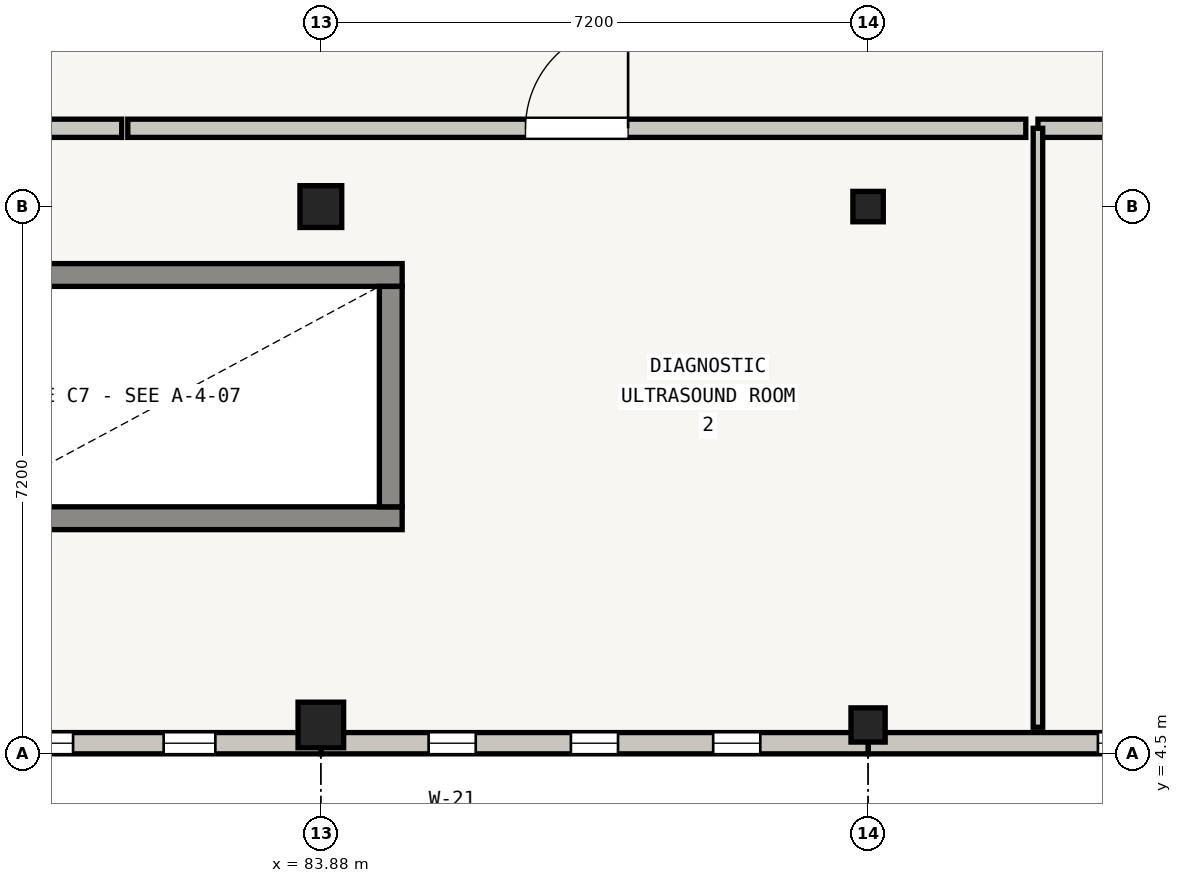
"""IFC4 building model, lengths in metres.
Left out: names, types, materials, properties, quantities, classifications, styles, units other than length and angle.
Written with IfcOpenShell. Run it as: python <this file> out.ifc"""

import sys

from ifc_helpers import new_model, si_unit, direction, frame, frame_2d, origin, origin_2d, place, context, subcontext, project, spatial, rectangle, extrude, element, fill, save


model = new_model("IFC4")
c1 = context("Model", 3, precision=1e-05, world=origin(), true_north=direction((0.0, 1.0)))
c2 = subcontext(c1, "Body", "Model", "MODEL_VIEW")
j1 = project(units=[si_unit("LENGTHUNIT", "METRE"), si_unit("PLANEANGLEUNIT", "RADIAN")], contexts=[c1])
p1 = place(None, origin())
s1 = spatial("IfcSite", under=j1, at=p1, CompositionType="ELEMENT")
p2 = place(p1, origin())
s2 = spatial("IfcBuilding", under=s1, at=p2, CompositionType="ELEMENT")
p3 = place(p2, frame((0.0, 0.0, 4.5)))
s3 = spatial("IfcBuildingStorey", under=s2, at=p3, CompositionType="ELEMENT", Elevation=4.5)
p4 = place(p3, frame((83.88, 4.88, 0.0), z_axis=(0.0, 0.0, 1.0), x_axis=(1.0, 0.0, 0.0)))
e1 = element("IfcColumn", 1, at=p4, inside=s3, PredefinedType="COLUMN", context=c2, shape_type="SweptSolid", body=[
    extrude(rectangle(XDim=0.6, YDim=0.6, at=origin_2d()), origin(), (0.0, 0.0, 1.0), 3.96),
])
p5 = place(p3, frame((83.88, 11.7, 0.0), z_axis=(0.0, 0.0, 1.0), x_axis=(1.0, 0.0, 0.0)))
e2 = element("IfcColumn", 2, at=p5, inside=s3, PredefinedType="COLUMN", context=c2, shape_type="SweptSolid", body=[
    extrude(rectangle(XDim=0.55, YDim=0.55, at=origin_2d()), origin(), (0.0, 0.0, 1.0), 3.96),
])
p6 = place(p3, frame((91.08, 4.88, 0.0), z_axis=(0.0, 0.0, 1.0), x_axis=(1.0, 0.0, 0.0)))
e3 = element("IfcColumn", 3, at=p6, inside=s3, PredefinedType="COLUMN", context=c2, shape_type="SweptSolid", body=[
    extrude(rectangle(XDim=0.45, YDim=0.45, at=origin_2d()), origin(), (0.0, 0.0, 1.0), 3.96),
])
p7 = place(p3, frame((91.08, 11.7, 0.0), z_axis=(0.0, 0.0, 1.0), x_axis=(1.0, 0.0, 0.0)))
e4 = element("IfcColumn", 4, at=p7, inside=s3, PredefinedType="COLUMN", context=c2, shape_type="SweptSolid", body=[
    extrude(rectangle(XDim=0.4, YDim=0.4, at=origin_2d()), origin(), (0.0, 0.0, 1.0), 3.96),
])
p8 = place(p3, frame((98.28, 4.64, 0.0), z_axis=(0.0, 0.0, 1.0), x_axis=(-1.0, 0.0, 0.0)))
e5 = element("IfcWall", 5, at=p8, inside=s3, PredefinedType="STANDARD", context=c2, shape_type="SweptSolid", body=[
    extrude(rectangle(XDim=7.2, YDim=0.28, at=frame_2d((3.6, 0.0))), origin(), (0.0, 0.0, 1.0), 3.656),
])
p9 = place(p8, frame((1.824, 0.0, 0.55)))
e6 = element("IfcOpeningElement", 6, at=p9, cuts=e5, PredefinedType="OPENING", context=c2, shape_type="SweptSolid", body=[
    extrude(rectangle(XDim=0.96, YDim=2.1, at=frame_2d((0.48, 1.05))), frame((0.0, 0.14, 0.0), z_axis=(0.0, -1.0, 0.0), x_axis=(1.0, 0.0, 0.0)), (0.0, 0.0, 1.0), 0.28),
])
p10 = place(p8, frame((3.216, 0.0, 0.55)))
e7 = element("IfcOpeningElement", 7, at=p10, cuts=e5, PredefinedType="OPENING", context=c2, shape_type="SweptSolid", body=[
    extrude(rectangle(XDim=0.96, YDim=2.1, at=frame_2d((0.48, 1.05))), frame((0.0, 0.14, 0.0), z_axis=(0.0, -1.0, 0.0), x_axis=(1.0, 0.0, 0.0)), (0.0, 0.0, 1.0), 0.28),
])
p11 = place(p3, frame((91.08, 4.64, 0.0), z_axis=(0.0, 0.0, 1.0), x_axis=(-1.0, 0.0, 0.0)))
e8 = element("IfcWall", 8, at=p11, inside=s3, PredefinedType="STANDARD", context=c2, shape_type="SweptSolid", body=[
    extrude(rectangle(XDim=7.2, YDim=0.28, at=frame_2d((3.6, 0.0))), origin(), (0.0, 0.0, 1.0), 3.656),
])
p12 = place(p11, frame((1.418, 0.0, 0.55)))
e9 = element("IfcOpeningElement", 9, at=p12, cuts=e8, PredefinedType="OPENING", context=c2, shape_type="SweptSolid", body=[
    extrude(rectangle(XDim=0.62, YDim=2.08, at=frame_2d((0.31, 1.04))), frame((0.0, 0.14, 0.0), z_axis=(0.0, -1.0, 0.0), x_axis=(1.0, 0.0, 0.0)), (0.0, 0.0, 1.0), 0.28),
])
p13 = place(p11, frame((3.29, 0.0, 0.55)))
e10 = element("IfcOpeningElement", 10, at=p13, cuts=e8, PredefinedType="OPENING", context=c2, shape_type="SweptSolid", body=[
    extrude(rectangle(XDim=0.62, YDim=2.08, at=frame_2d((0.31, 1.04))), frame((0.0, 0.14, 0.0), z_axis=(0.0, -1.0, 0.0), x_axis=(1.0, 0.0, 0.0)), (0.0, 0.0, 1.0), 0.28),
])
p14 = place(p11, frame((5.162, 0.0, 0.55)))
e11 = element("IfcOpeningElement", 11, at=p14, cuts=e8, PredefinedType="OPENING", context=c2, shape_type="SweptSolid", body=[
    extrude(rectangle(XDim=0.62, YDim=2.08, at=frame_2d((0.31, 1.04))), frame((0.0, 0.14, 0.0), z_axis=(0.0, -1.0, 0.0), x_axis=(1.0, 0.0, 0.0)), (0.0, 0.0, 1.0), 0.28),
])
p15 = place(p3, frame((83.88, 4.64, 0.0), z_axis=(0.0, 0.0, 1.0), x_axis=(-1.0, 0.0, 0.0)))
e12 = element("IfcWall", 12, at=p15, inside=s3, PredefinedType="STANDARD", context=c2, shape_type="SweptSolid", body=[
    extrude(rectangle(XDim=7.2, YDim=0.28, at=frame_2d((3.6, 0.0))), origin(), (0.0, 0.0, 1.0), 3.656),
])
p16 = place(p15, frame((1.388, 0.0, 0.55)))
e13 = element("IfcOpeningElement", 13, at=p16, cuts=e12, PredefinedType="OPENING", context=c2, shape_type="SweptSolid", body=[
    extrude(rectangle(XDim=0.68, YDim=2.08, at=frame_2d((0.34, 1.04))), frame((0.0, 0.14, 0.0), z_axis=(0.0, -1.0, 0.0), x_axis=(1.0, 0.0, 0.0)), (0.0, 0.0, 1.0), 0.28),
])
p17 = place(p15, frame((3.26, 0.0, 0.55)))
e14 = element("IfcOpeningElement", 14, at=p17, cuts=e12, PredefinedType="OPENING", context=c2, shape_type="SweptSolid", body=[
    extrude(rectangle(XDim=0.68, YDim=2.08, at=frame_2d((0.34, 1.04))), frame((0.0, 0.14, 0.0), z_axis=(0.0, -1.0, 0.0), x_axis=(1.0, 0.0, 0.0)), (0.0, 0.0, 1.0), 0.28),
])
p18 = place(p15, frame((5.132, 0.0, 0.55)))
e15 = element("IfcOpeningElement", 15, at=p18, cuts=e12, PredefinedType="OPENING", context=c2, shape_type="SweptSolid", body=[
    extrude(rectangle(XDim=0.68, YDim=2.08, at=frame_2d((0.34, 1.04))), frame((0.0, 0.14, 0.0), z_axis=(0.0, -1.0, 0.0), x_axis=(1.0, 0.0, 0.0)), (0.0, 0.0, 1.0), 0.28),
])
p19 = place(p3, frame((84.95, 7.6, 0.0), z_axis=(0.0, 0.0, 1.0), x_axis=(-1.0, 0.0, 0.0)))
e16 = element("IfcWall", 16, at=p19, inside=s3, PredefinedType="SHEAR", context=c2, shape_type="SweptSolid", body=[
    extrude(rectangle(XDim=7.3, YDim=0.3, at=frame_2d((3.65, 0.0))), origin(), (0.0, 0.0, 1.0), 3.885),
])
p20 = place(p3, frame((77.65, 10.8, 0.0), z_axis=(0.0, 0.0, 1.0), x_axis=(1.0, 0.0, 0.0)))
e17 = element("IfcWall", 17, at=p20, inside=s3, PredefinedType="SHEAR", context=c2, shape_type="SweptSolid", body=[
    extrude(rectangle(XDim=7.3, YDim=0.3, at=frame_2d((3.65, 0.0))), origin(), (0.0, 0.0, 1.0), 3.885),
])
p21 = place(p20, frame((0.16, 0.0, 0.0)))
e18 = element("IfcOpeningElement", 18, at=p21, cuts=e17, PredefinedType="OPENING", context=c2, shape_type="SweptSolid", body=[
    extrude(rectangle(XDim=1.1, YDim=2.05, at=frame_2d((0.55, 1.025))), frame((0.0, 0.15, 0.0), z_axis=(0.0, -1.0, 0.0), x_axis=(1.0, 0.0, 0.0)), (0.0, 0.0, 1.0), 0.3),
])
p22 = place(p3, frame((84.8, 10.65, 0.0), z_axis=(0.0, 0.0, 1.0), x_axis=(0.0, -1.0, 0.0)))
e19 = element("IfcWall", 19, at=p22, inside=s3, PredefinedType="SHEAR", context=c2, shape_type="SweptSolid", body=[
    extrude(rectangle(XDim=2.9, YDim=0.3, at=frame_2d((1.45, 0.0))), origin(), (0.0, 0.0, 1.0), 3.885),
])
p23 = place(p3, frame((65.84, 12.73, 0.0), z_axis=(0.0, 0.0, 1.0), x_axis=(1.0, 0.0, 0.0)))
e20 = element("IfcWall", 20, at=p23, inside=s3, PredefinedType="SOLIDWALL", context=c2, shape_type="SweptSolid", body=[
    extrude(rectangle(XDim=15.42, YDim=0.24, at=frame_2d((7.71, 0.0))), origin(), (0.0, 0.0, 1.0), 2.905),
])
p24 = place(p23, frame((7.035, 0.0, 0.0)))
e21 = element("IfcOpeningElement", 21, at=p24, cuts=e20, PredefinedType="OPENING", context=c2, shape_type="SweptSolid", body=[
    extrude(rectangle(XDim=1.35, YDim=2.1, at=frame_2d((0.675, 1.05))), frame((0.0, 0.12, 0.0), z_axis=(0.0, -1.0, 0.0), x_axis=(1.0, 0.0, 0.0)), (0.0, 0.0, 1.0), 0.24),
])
p25 = place(p3, frame((93.315, 12.73, 0.0), z_axis=(0.0, 0.0, 1.0), x_axis=(1.0, 0.0, 0.0)))
e22 = element("IfcWall", 22, at=p25, inside=s3, PredefinedType="SOLIDWALL", context=c2, shape_type="SweptSolid", body=[
    extrude(rectangle(XDim=11.815, YDim=0.24, at=frame_2d((5.907, 0.0))), origin(), (0.0, 0.0, 1.0), 2.905),
])
p26 = place(p25, frame((6.802, 0.0, 0.0)))
e23 = element("IfcOpeningElement", 23, at=p26, cuts=e22, PredefinedType="OPENING", context=c2, shape_type="SweptSolid", body=[
    extrude(rectangle(XDim=1.35, YDim=2.1, at=frame_2d((0.675, 1.05))), frame((0.0, 0.12, 0.0), z_axis=(0.0, -1.0, 0.0), x_axis=(1.0, 0.0, 0.0)), (0.0, 0.0, 1.0), 0.24),
])
p27 = place(p3, frame((93.315, 4.85, 0.0), z_axis=(0.0, 0.0, 1.0), x_axis=(0.0, 1.0, 0.0)))
e24 = element("IfcWall", 24, at=p27, inside=s3, PredefinedType="PARTITIONING", context=c2, shape_type="SweptSolid", body=[
    extrude(rectangle(XDim=7.88, YDim=0.125, at=frame_2d((3.94, 0.0))), origin(), (0.0, 0.0, 1.0), 2.905),
])
p28 = place(p3, frame((81.34, 12.73, 0.0), z_axis=(0.0, 0.0, 1.0), x_axis=(1.0, 0.0, 0.0)))
e25 = element("IfcWall", 25, at=p28, inside=s3, PredefinedType="SOLIDWALL", context=c2, shape_type="SweptSolid", body=[
    extrude(rectangle(XDim=11.815, YDim=0.24, at=frame_2d((5.907, 0.0))), origin(), (0.0, 0.0, 1.0), 2.905),
])
p29 = place(p28, frame((5.232, 0.0, 0.0)))
e26 = element("IfcOpeningElement", 26, at=p29, cuts=e25, PredefinedType="OPENING", context=c2, shape_type="SweptSolid", body=[
    extrude(rectangle(XDim=1.35, YDim=2.1, at=frame_2d((0.675, 1.05))), frame((0.0, 0.12, 0.0), z_axis=(0.0, -1.0, 0.0), x_axis=(1.0, 0.0, 0.0)), (0.0, 0.0, 1.0), 0.24),
])
p30 = place(p10, origin())
e27 = element("IfcWindow", 27, at=p30, inside=s3, PartitioningType="DOUBLE_PANEL_VERTICAL", PredefinedType="WINDOW", context=c2, shape_type="SweptSolid", body=[
    extrude(rectangle(XDim=0.96, YDim=2.1, at=frame_2d((0.48, 1.05))), frame((0.0, 0.03, 0.0), z_axis=(0.0, -1.0, 0.0), x_axis=(1.0, 0.0, 0.0)), (0.0, 0.0, 1.0), 0.06),
])
fill(e7, e27)
p31 = place(p12, origin())
e28 = element("IfcWindow", 28, at=p31, inside=s3, PartitioningType="SINGLE_PANEL", PredefinedType="WINDOW", context=c2, shape_type="SweptSolid", body=[
    extrude(rectangle(XDim=0.62, YDim=2.08, at=frame_2d((0.31, 1.04))), frame((0.0, 0.03, 0.0), z_axis=(0.0, -1.0, 0.0), x_axis=(1.0, 0.0, 0.0)), (0.0, 0.0, 1.0), 0.06),
])
fill(e9, e28)
p32 = place(p13, origin())
e29 = element("IfcWindow", 29, at=p32, inside=s3, PartitioningType="SINGLE_PANEL", PredefinedType="WINDOW", context=c2, shape_type="SweptSolid", body=[
    extrude(rectangle(XDim=0.62, YDim=2.08, at=frame_2d((0.31, 1.04))), frame((0.0, 0.03, 0.0), z_axis=(0.0, -1.0, 0.0), x_axis=(1.0, 0.0, 0.0)), (0.0, 0.0, 1.0), 0.06),
])
fill(e10, e29)
p33 = place(p14, origin())
e30 = element("IfcWindow", 30, at=p33, inside=s3, PartitioningType="SINGLE_PANEL", PredefinedType="WINDOW", context=c2, shape_type="SweptSolid", body=[
    extrude(rectangle(XDim=0.62, YDim=2.08, at=frame_2d((0.31, 1.04))), frame((0.0, 0.03, 0.0), z_axis=(0.0, -1.0, 0.0), x_axis=(1.0, 0.0, 0.0)), (0.0, 0.0, 1.0), 0.06),
])
fill(e11, e30)
p34 = place(p16, origin())
e31 = element("IfcWindow", 31, at=p34, inside=s3, PartitioningType="SINGLE_PANEL", PredefinedType="WINDOW", context=c2, shape_type="SweptSolid", body=[
    extrude(rectangle(XDim=0.68, YDim=2.08, at=frame_2d((0.34, 1.04))), frame((0.0, 0.03, 0.0), z_axis=(0.0, -1.0, 0.0), x_axis=(1.0, 0.0, 0.0)), (0.0, 0.0, 1.0), 0.06),
])
fill(e13, e31)
p35 = place(p17, origin())
e32 = element("IfcWindow", 32, at=p35, inside=s3, PartitioningType="SINGLE_PANEL", PredefinedType="WINDOW", context=c2, shape_type="SweptSolid", body=[
    extrude(rectangle(XDim=0.68, YDim=2.08, at=frame_2d((0.34, 1.04))), frame((0.0, 0.03, 0.0), z_axis=(0.0, -1.0, 0.0), x_axis=(1.0, 0.0, 0.0)), (0.0, 0.0, 1.0), 0.06),
])
fill(e14, e32)
p36 = place(p29, origin())
e33 = element("IfcDoor", 33, at=p36, inside=s3, OperationType="SINGLE_SWING_RIGHT", PredefinedType="DOOR", context=c2, shape_type="SweptSolid", body=[
    extrude(rectangle(XDim=1.35, YDim=2.1, at=frame_2d((0.675, 1.05))), frame((0.0, 0.025, 0.0), z_axis=(0.0, -1.0, 0.0), x_axis=(1.0, 0.0, 0.0)), (0.0, 0.0, 1.0), 0.05),
])
fill(e26, e33)
save(model, sys.argv[1])
